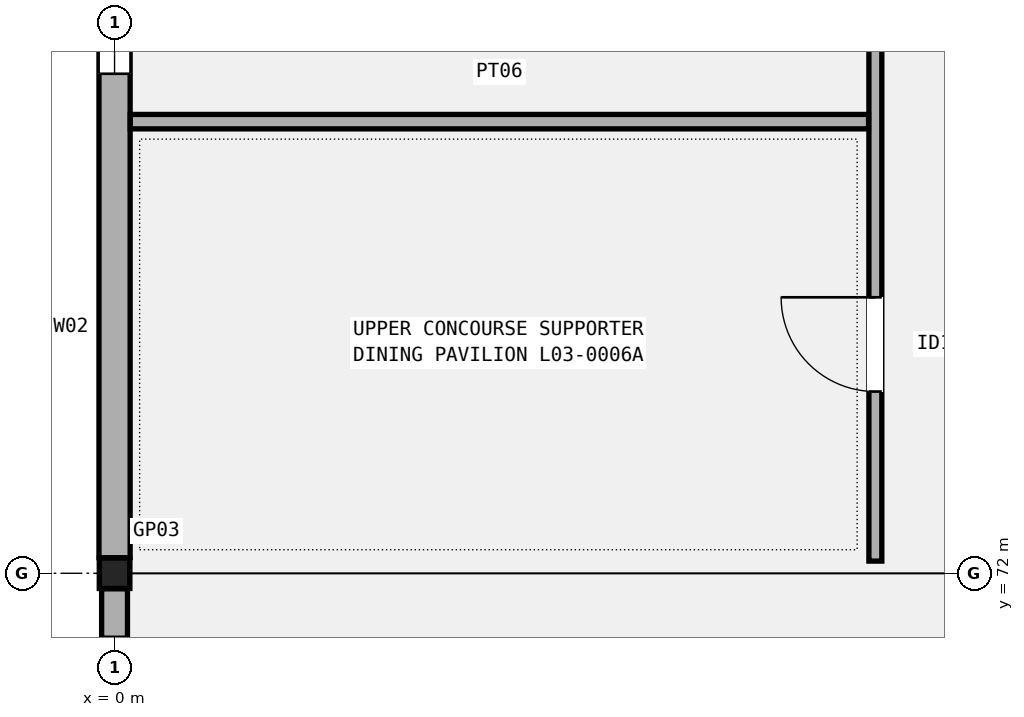
"""IFC4 building model, lengths in metres.
Left out: names, types, materials, properties, quantities, classifications, styles, units other than length and angle.
Written with IfcOpenShell. Run it as: python <this file> out.ifc"""

import sys

from ifc_helpers import new_model, si_unit, direction, frame, frame_2d, origin, origin_2d, place, context, subcontext, project, spatial, rectangle, hollow_rectangle, extrude, element, fill, save


model = new_model("IFC4")
c1 = context("Model", 3, precision=1e-05, world=origin(), true_north=direction((0.0, 1.0)))
c2 = subcontext(c1, "Body", "Model", "MODEL_VIEW")
j1 = project(units=[si_unit("LENGTHUNIT", "METRE"), si_unit("PLANEANGLEUNIT", "RADIAN")], contexts=[c1])
p1 = place(None, origin())
s1 = spatial("IfcSite", under=j1, at=p1, CompositionType="ELEMENT")
p2 = place(p1, origin())
s2 = spatial("IfcBuilding", under=s1, at=p2, CompositionType="ELEMENT")
p3 = place(p2, frame((0.0, 0.0, 15.3)))
s3 = spatial("IfcBuildingStorey", under=s2, at=p3, CompositionType="ELEMENT", Elevation=15.3)
p4 = place(p3, frame((0.0, 72.0, 0.0), z_axis=(0.0, 0.0, 1.0), x_axis=(1.0, 0.0, 0.0)))
e1 = element("IfcColumn", 1, at=p4, inside=s3, PredefinedType="COLUMN", context=c2, shape_type="SweptSolid", body=[
    extrude(hollow_rectangle(XDim=0.4, YDim=0.4, WallThickness=0.016, InnerFilletRadius=0.016, OuterFilletRadius=0.032, at=origin_2d()), origin(), (0.0, 0.0, 1.0), 5.1),
])
p5 = place(p3, frame((0.0, 71.146, 0.0), z_axis=(0.0, 0.0, 1.0), x_axis=(0.0, 1.0, 0.0)))
e2 = element("IfcWall", 2, at=p5, inside=s3, PredefinedType="SOLIDWALL", context=c2, shape_type="SweptSolid", body=[
    extrude(rectangle(XDim=0.65, YDim=0.34, at=frame_2d((0.325, 0.0))), origin(), (0.0, 0.0, 1.0), 4.172),
])
p6 = place(p3, frame((0.0, 72.204, 0.0), z_axis=(0.0, 0.0, 1.0), x_axis=(0.0, 1.0, 0.0)))
e3 = element("IfcWall", 3, at=p6, inside=s3, PredefinedType="SOLIDWALL", context=c2, shape_type="SweptSolid", body=[
    extrude(rectangle(XDim=11.617, YDim=0.41, at=frame_2d((5.809, 0.0))), origin(), (0.0, 0.0, 1.0), 4.06),
])
p7 = place(p6, frame((6.368, 0.0, 0.95)))
e4 = element("IfcOpeningElement", 4, at=p7, cuts=e3, PredefinedType="OPENING", context=c2, shape_type="SweptSolid", body=[
    extrude(rectangle(XDim=1.8, YDim=2.55, at=frame_2d((0.9, 1.275))), frame((0.0, 0.215, 0.0), z_axis=(0.0, -1.0, 0.0), x_axis=(1.0, 0.0, 0.0)), (0.0, 0.0, 1.0), 0.43),
])
p8 = place(p3, frame((10.01, 72.16, 0.0), z_axis=(0.0, 0.0, 1.0), x_axis=(0.0, 1.0, 0.0)))
e5 = element("IfcWall", 5, at=p8, inside=s3, PredefinedType="PARTITIONING", context=c2, shape_type="SweptSolid", body=[
    extrude(rectangle(XDim=11.68, YDim=0.17, at=frame_2d((5.84, 0.0))), origin(), (0.0, 0.0, 1.0), 4.22),
])
p9 = place(p8, frame((2.231, 0.0, 0.0)))
e6 = element("IfcOpeningElement", 6, at=p9, cuts=e5, PredefinedType="OPENING", context=c2, shape_type="SweptSolid", body=[
    extrude(rectangle(XDim=1.24, YDim=2.22, at=frame_2d((0.62, 1.11))), frame((0.0, 0.095, 0.0), z_axis=(0.0, -1.0, 0.0), x_axis=(1.0, 0.0, 0.0)), (0.0, 0.0, 1.0), 0.19),
])
p10 = place(p8, frame((8.136, 0.0, 0.0)))
e7 = element("IfcOpeningElement", 7, at=p10, cuts=e5, PredefinedType="OPENING", context=c2, shape_type="SweptSolid", body=[
    extrude(rectangle(XDim=1.27, YDim=2.2, at=frame_2d((0.635, 1.1))), frame((0.0, 0.095, 0.0), z_axis=(0.0, -1.0, 0.0), x_axis=(1.0, 0.0, 0.0)), (0.0, 0.0, 1.0), 0.19),
])
p11 = place(p3, frame((0.207, 77.942, 0.0), z_axis=(0.0, 0.0, 1.0), x_axis=(1.0, 0.0, 0.0)))
e8 = element("IfcWall", 8, at=p11, inside=s3, PredefinedType="PARTITIONING", context=c2, shape_type="SweptSolid", body=[
    extrude(rectangle(XDim=9.713, YDim=0.19, at=frame_2d((4.856, 0.0))), origin(), (0.0, 0.0, 1.0), 4.22),
])
p12 = place(p7, origin())
e9 = element("IfcWindow", 9, at=p12, inside=s3, PartitioningType="SINGLE_PANEL", PredefinedType="WINDOW", context=c2, shape_type="SweptSolid", body=[
    extrude(rectangle(XDim=1.8, YDim=2.55, at=frame_2d((0.9, 1.275))), frame((0.0, 0.03, 0.0), z_axis=(0.0, -1.0, 0.0), x_axis=(1.0, 0.0, 0.0)), (0.0, 0.0, 1.0), 0.06),
])
fill(e4, e9)
p13 = place(p9, origin())
e10 = element("IfcDoor", 10, at=p13, inside=s3, OperationType="SINGLE_SWING_RIGHT", PredefinedType="DOOR", context=c2, shape_type="SweptSolid", body=[
    extrude(rectangle(XDim=1.24, YDim=2.22, at=frame_2d((0.62, 1.11))), frame((0.0, 0.025, 0.0), z_axis=(0.0, -1.0, 0.0), x_axis=(1.0, 0.0, 0.0)), (0.0, 0.0, 1.0), 0.05),
])
fill(e6, e10)
save(model, sys.argv[1])
